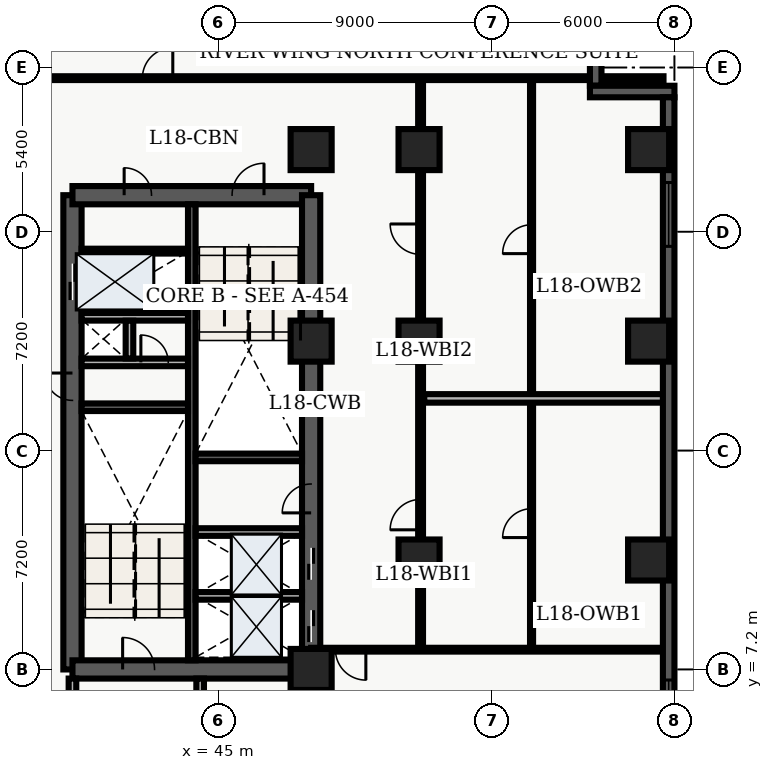
"""IFC4 building model, lengths in metres.
Left out: names, types, materials, properties, quantities, classifications, styles, units other than length and angle.
Written with IfcOpenShell. Run it as: python <this file> out.ifc"""

import sys

from ifc_helpers import new_model, entity, si_unit, converted_unit, direction, frame, origin_with_axes, origin_2d_with_axis, place, context, subcontext, project, spatial, polyline, rectangle, outline, extrude, element, fill, save


model = new_model("IFC4")
c1 = context("Model", 3, precision=1e-05, world=origin_with_axes(), true_north=direction((0.0, 1.0)))
c2 = subcontext(c1, "Body", "Model", "MODEL_VIEW")
j1 = project(units=[si_unit("LENGTHUNIT", "METRE"), converted_unit("PLANEANGLEUNIT", "DEGREE", entity("IfcPlaneAngleMeasure", 0.017), si_unit("PLANEANGLEUNIT", "RADIAN"), dimensions=[0, 0, 0, 0, 0, 0, 0])], contexts=[c1])
p1 = place(None, origin_with_axes())
s1 = spatial("IfcSite", under=j1, at=p1, CompositionType="ELEMENT")
p2 = place(p1, origin_with_axes())
s2 = spatial("IfcBuilding", under=s1, at=p2, CompositionType="ELEMENT")
p3 = place(p2, frame((0.0, 0.0, 75.6), z_axis=(0.0, 0.0, 1.0), x_axis=(1.0, 0.0, 0.0)))
s3 = spatial("IfcBuildingStorey", under=s2, at=p3, CompositionType="ELEMENT", Elevation=75.6)
p4 = place(p3, frame((40.2, 7.2, 0.0), z_axis=(0.0, 0.0, 1.0), x_axis=(0.0, 1.0, 0.0)))
e1 = element("IfcWall", 1, at=p4, inside=s3, PredefinedType="SHEAR", context=c2, shape_type="SweptSolid", body=[
    extrude(outline(polyline([(0.0, -0.3), (15.6, -0.3), (15.6, 0.3), (0.0, 0.3), (0.0, -0.3)])), origin_with_axes(), (0.0, 0.0, 1.0), 3.6),
])
p5 = place(p4, frame((12.75, 0.0, 0.0), z_axis=(0.0, 0.0, 1.0), x_axis=(1.0, 0.0, 0.0)))
e2 = element("IfcOpeningElement", 2, at=p5, cuts=e1, PredefinedType="OPENING", context=c2, shape_type="SweptSolid", body=[
    extrude(rectangle(XDim=1.2, YDim=0.62, at=origin_2d_with_axis()), origin_with_axes(), (0.0, 0.0, 1.0), 2.15),
])
p6 = place(p4, frame((9.3, 0.0, 0.0), z_axis=(0.0, 0.0, 1.0), x_axis=(1.0, 0.0, 0.0)))
e3 = element("IfcOpeningElement", 3, at=p6, cuts=e1, PredefinedType="OPENING", context=c2, shape_type="SweptSolid", body=[
    extrude(rectangle(XDim=0.9, YDim=0.62, at=origin_2d_with_axis()), origin_with_axes(), (0.0, 0.0, 1.0), 2.15),
])
p7 = place(p3, frame((40.2, 7.2, 0.0), z_axis=(0.0, 0.0, 1.0), x_axis=(1.0, 0.0, 0.0)))
e4 = element("IfcWall", 4, at=p7, inside=s3, PredefinedType="SHEAR", context=c2, shape_type="SweptSolid", body=[
    extrude(outline(polyline([(0.0, -0.3), (7.85, -0.3), (7.85, 0.3), (0.0, 0.3), (0.0, -0.3)])), origin_with_axes(), (0.0, 0.0, 1.0), 3.6),
])
p8 = place(p7, frame((2.175, 0.0, 0.0), z_axis=(0.0, 0.0, 1.0), x_axis=(1.0, 0.0, 0.0)))
e5 = element("IfcOpeningElement", 5, at=p8, cuts=e4, PredefinedType="OPENING", context=c2, shape_type="SweptSolid", body=[
    extrude(rectangle(XDim=1.05, YDim=0.62, at=origin_2d_with_axis()), origin_with_axes(), (0.0, 0.0, 1.0), 2.15),
])
p9 = place(p3, frame((40.2, 22.8, 0.0), z_axis=(0.0, 0.0, 1.0), x_axis=(1.0, 0.0, 0.0)))
e6 = element("IfcWall", 6, at=p9, inside=s3, PredefinedType="SHEAR", context=c2, shape_type="SweptSolid", body=[
    extrude(outline(polyline([(0.0, -0.3), (7.85, -0.3), (7.85, 0.3), (0.0, 0.3), (0.0, -0.3)])), origin_with_axes(), (0.0, 0.0, 1.0), 3.6),
])
p10 = place(p9, frame((5.775, 0.0, 0.0), z_axis=(0.0, 0.0, 1.0), x_axis=(1.0, 0.0, 0.0)))
e7 = element("IfcOpeningElement", 7, at=p10, cuts=e6, PredefinedType="OPENING", context=c2, shape_type="SweptSolid", body=[
    extrude(rectangle(XDim=1.05, YDim=0.62, at=origin_2d_with_axis()), origin_with_axes(), (0.0, 0.0, 1.0), 2.15),
])
p11 = place(p9, frame((2.15, 0.0, 0.0), z_axis=(0.0, 0.0, 1.0), x_axis=(1.0, 0.0, 0.0)))
e8 = element("IfcOpeningElement", 8, at=p11, cuts=e6, PredefinedType="OPENING", context=c2, shape_type="SweptSolid", body=[
    extrude(rectangle(XDim=0.9, YDim=0.62, at=origin_2d_with_axis()), origin_with_axes(), (0.0, 0.0, 1.0), 2.15),
])
p12 = place(p3, frame((48.05, 7.2, 0.0), z_axis=(0.0, 0.0, 1.0), x_axis=(0.0, 1.0, 0.0)))
e9 = element("IfcWall", 9, at=p12, inside=s3, PredefinedType="SHEAR", context=c2, shape_type="SweptSolid", body=[
    extrude(outline(polyline([(0.0, -0.3), (15.6, -0.3), (15.6, 0.3), (0.0, 0.3), (0.0, -0.3)])), origin_with_axes(), (0.0, 0.0, 1.0), 3.6),
])
p13 = place(p12, frame((1.425, 0.0, 0.0), z_axis=(0.0, 0.0, 1.0), x_axis=(1.0, 0.0, 0.0)))
e10 = element("IfcOpeningElement", 10, at=p13, cuts=e9, PredefinedType="OPENING", context=c2, shape_type="SweptSolid", body=[
    extrude(rectangle(XDim=1.05, YDim=0.62, at=origin_2d_with_axis()), origin_with_axes(), (0.0, 0.0, 1.0), 2.15),
])
p14 = place(p12, frame((3.475, 0.0, 0.0), z_axis=(0.0, 0.0, 1.0), x_axis=(1.0, 0.0, 0.0)))
e11 = element("IfcOpeningElement", 11, at=p14, cuts=e9, PredefinedType="OPENING", context=c2, shape_type="SweptSolid", body=[
    extrude(rectangle(XDim=1.05, YDim=0.62, at=origin_2d_with_axis()), origin_with_axes(), (0.0, 0.0, 1.0), 2.15),
])
p15 = place(p12, frame((5.625, 0.0, 0.0), z_axis=(0.0, 0.0, 1.0), x_axis=(1.0, 0.0, 0.0)))
e12 = element("IfcOpeningElement", 12, at=p15, cuts=e9, PredefinedType="OPENING", context=c2, shape_type="SweptSolid", body=[
    extrude(rectangle(XDim=0.95, YDim=0.62, at=origin_2d_with_axis()), origin_with_axes(), (0.0, 0.0, 1.0), 2.15),
])
p16 = place(p3, frame((44.125, 7.5, 0.0), z_axis=(0.0, 0.0, 1.0), x_axis=(0.0, 1.0, 0.0)))
e13 = element("IfcWall", 13, at=p16, inside=s3, PredefinedType="SHEAR", context=c2, shape_type="SweptSolid", body=[
    extrude(outline(polyline([(0.0, -0.125), (15.0, -0.125), (15.0, 0.125), (0.0, 0.125), (0.0, -0.125)])), origin_with_axes(), (0.0, 0.0, 1.0), 3.6),
])
for number, where, z_axis, x_axis in (
    (14, (40.5, 15.825, 0.0), (0.0, 0.0, 1.0), (1.0, 0.0, 0.0)),
    (15, (44.25, 14.175, 0.0), (0.0, 0.0, 1.0), (1.0, 0.0, 0.0)),
):
    element("IfcWall", number, at=place(p3, frame(where, z_axis=z_axis, x_axis=x_axis)), inside=s3, PredefinedType="SHEAR", context=c2, shape_type="SweptSolid", body=[
        extrude(outline(polyline([(0.0, -0.125), (3.5, -0.125), (3.5, 0.125), (0.0, 0.125), (0.0, -0.125)])), origin_with_axes(), (0.0, 0.0, 1.0), 3.6),
    ])
p17 = place(p3, frame((40.5, 17.3, 0.0), z_axis=(0.0, 0.0, 1.0), x_axis=(1.0, 0.0, 0.0)))
e16 = element("IfcWall", 16, at=p17, inside=s3, PredefinedType="SOLIDWALL", context=c2, shape_type="SweptSolid", body=[
    extrude(outline(polyline([(0.0, -0.125), (3.5, -0.125), (3.5, 0.125), (0.0, 0.125), (0.0, -0.125)])), origin_with_axes(), (0.0, 0.0, 1.0), 2.64),
])
p18 = place(p17, frame((2.4, 0.0, 0.0), z_axis=(0.0, 0.0, 1.0), x_axis=(1.0, 0.0, 0.0)))
e17 = element("IfcOpeningElement", 17, at=p18, cuts=e16, PredefinedType="OPENING", context=c2, shape_type="SweptSolid", body=[
    extrude(rectangle(XDim=0.9, YDim=0.27, at=origin_2d_with_axis()), origin_with_axes(), (0.0, 0.0, 1.0), 2.15),
])
p19 = place(p3, frame((40.5, 18.8, 0.0), z_axis=(0.0, 0.0, 1.0), x_axis=(1.0, 0.0, 0.0)))
e18 = element("IfcWall", 18, at=p19, inside=s3, PredefinedType="SOLIDWALL", context=c2, shape_type="SweptSolid", body=[
    extrude(outline(polyline([(0.0, -0.125), (3.5, -0.125), (3.5, 0.125), (0.0, 0.125), (0.0, -0.125)])), origin_with_axes(), (0.0, 0.0, 1.0), 2.64),
])
p20 = place(p3, frame((42.075, 17.43, 0.0), z_axis=(0.0, 0.0, 1.0), x_axis=(0.0, 1.0, 0.0)))
e19 = element("IfcWall", 19, at=p20, inside=s3, PredefinedType="SOLIDWALL", context=c2, shape_type="SweptSolid", body=[
    extrude(outline(polyline([(0.0, -0.125), (1.24, -0.125), (1.24, 0.125), (0.0, 0.125), (0.0, -0.125)])), origin_with_axes(), (0.0, 0.0, 1.0), 2.64),
])
p21 = place(p3, frame((40.2, 3.1, 0.0), z_axis=(0.0, 0.0, 1.0), x_axis=(0.0, 1.0, 0.0)))
e20 = element("IfcWall", 20, at=p21, inside=s3, PredefinedType="SOLIDWALL", context=c2, shape_type="SweptSolid", body=[
    extrude(outline(polyline([(0.0, -0.125), (3.8, -0.125), (3.8, 0.125), (0.0, 0.125), (0.0, -0.125)])), origin_with_axes(), (0.0, 0.0, 1.0), 2.64),
])
p22 = place(p21, frame((2.075, 0.0, 0.0), z_axis=(0.0, 0.0, 1.0), x_axis=(1.0, 0.0, 0.0)))
e21 = element("IfcOpeningElement", 21, at=p22, cuts=e20, PredefinedType="OPENING", context=c2, shape_type="SweptSolid", body=[
    extrude(rectangle(XDim=1.05, YDim=0.27, at=origin_2d_with_axis()), origin_with_axes(), (0.0, 0.0, 1.0), 2.15),
])
p23 = place(p3, frame((44.4, 3.1, 0.0), z_axis=(0.0, 0.0, 1.0), x_axis=(0.0, 1.0, 0.0)))
e22 = element("IfcWall", 22, at=p23, inside=s3, PredefinedType="SOLIDWALL", context=c2, shape_type="SweptSolid", body=[
    extrude(outline(polyline([(0.0, -0.125), (3.8, -0.125), (3.8, 0.125), (0.0, 0.125), (0.0, -0.125)])), origin_with_axes(), (0.0, 0.0, 1.0), 2.64),
])
for number, where, z_axis, x_axis in (
    (23, (48.05, 7.2, 0.0), (0.0, 0.0, 1.0), (1.0, 0.0, 0.0)),
    (24, (48.05, 18.0, 0.0), (0.0, 0.0, 1.0), (1.0, 0.0, 0.0)),
    (25, (48.05, 24.3, 0.0), (0.0, 0.0, 1.0), (1.0, 0.0, 0.0)),
    (26, (51.6, 10.8, 0.0), (0.0, 0.0, 1.0), (1.0, 0.0, 0.0)),
    (27, (51.6, 18.0, 0.0), (0.0, 0.0, 1.0), (1.0, 0.0, 0.0)),
    (28, (51.6, 24.3, 0.0), (0.0, 0.0, 1.0), (1.0, 0.0, 0.0)),
    (29, (59.15, 10.8, 0.0), (0.0, 0.0, 1.0), (1.0, 0.0, 0.0)),
    (30, (59.15, 18.0, 0.0), (0.0, 0.0, 1.0), (1.0, 0.0, 0.0)),
    (31, (59.15, 24.3, 0.0), (0.0, 0.0, 1.0), (1.0, 0.0, 0.0)),
):
    element("IfcColumn", number, at=place(p3, frame(where, z_axis=z_axis, x_axis=x_axis)), inside=s3, PredefinedType="COLUMN", context=c2, shape_type="SweptSolid", body=[
        extrude(rectangle(XDim=1.35, YDim=1.35, at=origin_2d_with_axis()), origin_with_axes(), (0.0, 0.0, 1.0), 3.9),
    ])
p24 = place(p3, frame((40.5, 20.96, 0.0), z_axis=(0.0, 0.0, 1.0), x_axis=(1.0, 0.0, 0.0)))
e32 = element("IfcWall", 32, at=p24, inside=s3, PredefinedType="PARTITIONING", context=c2, shape_type="SweptSolid", body=[
    extrude(outline(polyline([(0.0, -0.08), (3.5, -0.08), (3.5, 0.08), (0.0, 0.08), (0.0, -0.08)])), origin_with_axes(), (0.0, 0.0, 1.0), 2.64),
])
for number, where, z_axis, x_axis in (
    (33, (44.25, 9.62, 0.0), (0.0, 0.0, 1.0), (1.0, 0.0, 0.0)),
    (34, (44.25, 11.72, 0.0), (0.0, 0.0, 1.0), (1.0, 0.0, 0.0)),
):
    element("IfcWall", number, at=place(p3, frame(where, z_axis=z_axis, x_axis=x_axis)), inside=s3, PredefinedType="SOLIDWALL", context=c2, shape_type="SweptSolid", body=[
        extrude(outline(polyline([(0.0, -0.125), (3.5, -0.125), (3.5, 0.125), (0.0, 0.125), (0.0, -0.125)])), origin_with_axes(), (0.0, 0.0, 1.0), 2.64),
    ])
p25 = place(p3, frame((51.65, 7.85, 0.0), z_axis=(0.0, 0.0, 1.0), x_axis=(0.0, 1.0, 0.0)))
e35 = element("IfcWall", 35, at=p25, inside=s3, PredefinedType="PARTITIONING", context=c2, shape_type="SweptSolid", body=[
    extrude(outline(polyline([(0.0, -0.08), (18.8, -0.08), (18.8, 0.08), (0.0, 0.08), (0.0, -0.08)])), origin_with_axes(), (0.0, 0.0, 1.0), 2.64),
])
p26 = place(p25, frame((4.443, 0.0, 0.0), z_axis=(0.0, 0.0, 1.0), x_axis=(1.0, 0.0, 0.0)))
e36 = element("IfcOpeningElement", 36, at=p26, cuts=e35, PredefinedType="OPENING", context=c2, shape_type="SweptSolid", body=[
    extrude(rectangle(XDim=1.0, YDim=0.18, at=origin_2d_with_axis()), origin_with_axes(), (0.0, 0.0, 1.0), 2.15),
])
p27 = place(p25, frame((13.503, 0.0, 0.0), z_axis=(0.0, 0.0, 1.0), x_axis=(1.0, 0.0, 0.0)))
e37 = element("IfcOpeningElement", 37, at=p27, cuts=e35, PredefinedType="OPENING", context=c2, shape_type="SweptSolid", body=[
    extrude(rectangle(XDim=1.0, YDim=0.18, at=origin_2d_with_axis()), origin_with_axes(), (0.0, 0.0, 1.0), 2.15),
])
p28 = place(p3, frame((59.64, 7.85, 0.0), z_axis=(0.0, 0.0, 1.0), x_axis=(-1.0, 0.0, 0.0)))
e38 = element("IfcWall", 38, at=p28, inside=s3, PredefinedType="PARTITIONING", context=c2, shape_type="SweptSolid", body=[
    extrude(outline(polyline([(0.0, -0.062), (11.59, -0.062), (11.59, 0.062), (0.0, 0.062), (0.0, -0.062)])), origin_with_axes(), (0.0, 0.0, 1.0), 2.64),
])
p29 = place(p28, frame((10.29, 0.0, 0.0), z_axis=(0.0, 0.0, 1.0), x_axis=(1.0, 0.0, 0.0)))
e39 = element("IfcOpeningElement", 39, at=p29, cuts=e38, PredefinedType="OPENING", context=c2, shape_type="SweptSolid", body=[
    extrude(rectangle(XDim=1.0, YDim=0.145, at=origin_2d_with_axis()), origin_with_axes(), (0.0, 0.0, 1.0), 2.15),
])
p30 = place(p3, frame((38.76, 26.65, 0.0), z_axis=(0.0, 0.0, 1.0), x_axis=(1.0, 0.0, 0.0)))
e40 = element("IfcWall", 40, at=p30, inside=s3, PredefinedType="PARTITIONING", context=c2, shape_type="SweptSolid", body=[
    extrude(outline(polyline([(0.0, -0.062), (20.88, -0.062), (20.88, 0.062), (0.0, 0.062), (0.0, -0.062)])), origin_with_axes(), (0.0, 0.0, 1.0), 2.64),
])
p31 = place(p30, frame((4.24, 0.0, 0.0), z_axis=(0.0, 0.0, 1.0), x_axis=(1.0, 0.0, 0.0)))
e41 = element("IfcOpeningElement", 41, at=p31, cuts=e40, PredefinedType="OPENING", context=c2, shape_type="SweptSolid", body=[
    extrude(rectangle(XDim=1.0, YDim=0.145, at=origin_2d_with_axis()), origin_with_axes(), (0.0, 0.0, 1.0), 2.15),
])
p32 = place(p3, frame((55.3, 7.98, 0.0), z_axis=(0.0, 0.0, 1.0), x_axis=(0.0, 1.0, 0.0)))
e42 = element("IfcWall", 42, at=p32, inside=s3, PredefinedType="PARTITIONING", context=c2, shape_type="SweptSolid", body=[
    extrude(outline(polyline([(0.0, -0.05), (18.54, -0.05), (18.54, 0.05), (0.0, 0.05), (0.0, -0.05)])), origin_with_axes(), (0.0, 0.0, 1.0), 2.64),
])
p33 = place(p32, frame((4.033, 0.0, 0.0), z_axis=(0.0, 0.0, 1.0), x_axis=(1.0, 0.0, 0.0)))
e43 = element("IfcOpeningElement", 43, at=p33, cuts=e42, PredefinedType="OPENING", context=c2, shape_type="SweptSolid", body=[
    extrude(rectangle(XDim=0.95, YDim=0.12, at=origin_2d_with_axis()), origin_with_axes(), (0.0, 0.0, 1.0), 2.15),
])
p34 = place(p32, frame((13.373, 0.0, 0.0), z_axis=(0.0, 0.0, 1.0), x_axis=(1.0, 0.0, 0.0)))
e44 = element("IfcOpeningElement", 44, at=p34, cuts=e42, PredefinedType="OPENING", context=c2, shape_type="SweptSolid", body=[
    extrude(rectangle(XDim=0.95, YDim=0.12, at=origin_2d_with_axis()), origin_with_axes(), (0.0, 0.0, 1.0), 2.15),
])
p35 = place(p3, frame((51.77, 16.116, 0.0), z_axis=(0.0, 0.0, 1.0), x_axis=(1.0, 0.0, 0.0)))
e45 = element("IfcWall", 45, at=p35, inside=s3, PredefinedType="PARTITIONING", context=c2, shape_type="SweptSolid", body=[
    extrude(outline(polyline([(0.0, -0.14), (7.855, -0.14), (7.855, 0.14), (0.0, 0.14), (0.0, -0.14)])), origin_with_axes(), (0.0, 0.0, 1.0), 2.64),
])
p36 = place(p3, frame((57.41, 28.42, 0.0), z_axis=(0.0, 0.0, 1.0), x_axis=(0.0, -1.0, 0.0)))
e46 = element("IfcWall", 46, at=p36, inside=s3, PredefinedType="SOLIDWALL", context=c2, shape_type="SweptSolid", body=[
    extrude(outline(polyline([(0.0, -0.19), (2.02, -0.19), (2.02, 0.19), (0.0, 0.19), (0.0, -0.19)])), origin_with_axes(), (0.0, 0.0, 1.0), 3.6),
])
p37 = place(p3, frame((57.22, 26.21, 0.0), z_axis=(0.0, 0.0, 1.0), x_axis=(1.0, 0.0, 0.0)))
e47 = element("IfcWall", 47, at=p37, inside=s3, PredefinedType="SOLIDWALL", context=c2, shape_type="SweptSolid", body=[
    extrude(outline(polyline([(0.0, -0.19), (2.78, -0.19), (2.78, 0.19), (0.0, 0.19), (0.0, -0.19)])), origin_with_axes(), (0.0, 0.0, 1.0), 3.6),
])
p38 = place(p3, frame((59.81, 26.02, 0.0), z_axis=(0.0, 0.0, 1.0), x_axis=(0.0, -1.0, 0.0)))
e48 = element("IfcWall", 48, at=p38, inside=s3, PredefinedType="SOLIDWALL", context=c2, shape_type="SweptSolid", body=[
    extrude(outline(polyline([(0.0, -0.19), (23.62, -0.19), (23.62, 0.19), (0.0, 0.19), (0.0, -0.19)])), origin_with_axes(), (0.0, 0.0, 1.0), 3.6),
])
p39 = place(p38, frame((3.853, 0.0, 0.45), z_axis=(0.0, 0.0, 1.0), x_axis=(1.0, 0.0, 0.0)))
e49 = element("IfcOpeningElement", 49, at=p39, cuts=e48, PredefinedType="OPENING", context=c2, shape_type="SweptSolid", body=[
    extrude(rectangle(XDim=2.1, YDim=0.4, at=origin_2d_with_axis()), origin_with_axes(), (0.0, 0.0, 1.0), 2.2),
])
p40 = place(p38, frame((20.218, 0.0, 0.45), z_axis=(0.0, 0.0, 1.0), x_axis=(1.0, 0.0, 0.0)))
e50 = element("IfcOpeningElement", 50, at=p40, cuts=e48, PredefinedType="OPENING", context=c2, shape_type="SweptSolid", body=[
    extrude(rectangle(XDim=2.1, YDim=0.4, at=origin_2d_with_axis()), origin_with_axes(), (0.0, 0.0, 1.0), 2.2),
])
p41 = place(p12, frame((1.425, 0.0, 0.0), z_axis=(0.0, 0.0, 1.0), x_axis=(1.0, 0.0, 0.0)))
e51 = element("IfcDoor", 51, at=p41, inside=s3, OperationType="SLIDING_TO_LEFT", PredefinedType="DOOR", context=c2, shape_type="SweptSolid", body=[
    extrude(rectangle(XDim=1.05, YDim=0.09, at=origin_2d_with_axis()), origin_with_axes(), (0.0, 0.0, 1.0), 2.15),
])
fill(e10, e51)
p42 = place(p12, frame((3.475, 0.0, 0.0), z_axis=(0.0, 0.0, 1.0), x_axis=(1.0, 0.0, 0.0)))
e52 = element("IfcDoor", 52, at=p42, inside=s3, OperationType="SLIDING_TO_RIGHT", PredefinedType="DOOR", context=c2, shape_type="SweptSolid", body=[
    extrude(rectangle(XDim=1.05, YDim=0.09, at=origin_2d_with_axis()), origin_with_axes(), (0.0, 0.0, 1.0), 2.15),
])
fill(e11, e52)
p43 = place(p4, frame((12.75, 0.0, 0.0), z_axis=(0.0, 0.0, 1.0), x_axis=(1.0, 0.0, 0.0)))
e53 = element("IfcDoor", 53, at=p43, inside=s3, OperationType="DOUBLE_DOOR_SLIDING", PredefinedType="DOOR", context=c2, shape_type="SweptSolid", body=[
    extrude(rectangle(XDim=1.2, YDim=0.09, at=origin_2d_with_axis()), origin_with_axes(), (0.0, 0.0, 1.0), 2.15),
])
fill(e2, e53)
p44 = place(p4, frame((9.3, 0.0, 0.0), z_axis=(0.0, 0.0, 1.0), x_axis=(1.0, 0.0, 0.0)))
e54 = element("IfcDoor", 54, at=p44, inside=s3, OperationType="SINGLE_SWING_RIGHT", PredefinedType="DOOR", context=c2, shape_type="SweptSolid", body=[
    extrude(rectangle(XDim=0.9, YDim=0.09, at=origin_2d_with_axis()), origin_with_axes(), (0.0, 0.0, 1.0), 2.15),
])
fill(e3, e54)
p45 = place(p17, frame((2.4, 0.0, 0.0), z_axis=(0.0, 0.0, 1.0), x_axis=(1.0, 0.0, 0.0)))
e55 = element("IfcDoor", 55, at=p45, inside=s3, OperationType="SINGLE_SWING_LEFT", PredefinedType="DOOR", context=c2, shape_type="SweptSolid", body=[
    extrude(rectangle(XDim=0.9, YDim=0.09, at=origin_2d_with_axis()), origin_with_axes(), (0.0, 0.0, 1.0), 2.15),
])
fill(e17, e55)
p46 = place(p7, frame((2.175, 0.0, 0.0), z_axis=(0.0, 0.0, 1.0), x_axis=(1.0, 0.0, 0.0)))
e56 = element("IfcDoor", 56, at=p46, inside=s3, OperationType="SINGLE_SWING_LEFT", PredefinedType="DOOR", context=c2, shape_type="SweptSolid", body=[
    extrude(rectangle(XDim=1.05, YDim=0.09, at=origin_2d_with_axis()), origin_with_axes(), (0.0, 0.0, 1.0), 2.15),
])
fill(e5, e56)
p47 = place(p9, frame((5.775, 0.0, 0.0), z_axis=(0.0, 0.0, 1.0), x_axis=(1.0, 0.0, 0.0)))
e57 = element("IfcDoor", 57, at=p47, inside=s3, OperationType="SINGLE_SWING_RIGHT", PredefinedType="DOOR", context=c2, shape_type="SweptSolid", body=[
    extrude(rectangle(XDim=1.05, YDim=0.09, at=origin_2d_with_axis()), origin_with_axes(), (0.0, 0.0, 1.0), 2.15),
])
fill(e7, e57)
p48 = place(p9, frame((2.15, 0.0, 0.0), z_axis=(0.0, 0.0, 1.0), x_axis=(1.0, 0.0, 0.0)))
e58 = element("IfcDoor", 58, at=p48, inside=s3, OperationType="SINGLE_SWING_LEFT", PredefinedType="DOOR", context=c2, shape_type="SweptSolid", body=[
    extrude(rectangle(XDim=0.9, YDim=0.09, at=origin_2d_with_axis()), origin_with_axes(), (0.0, 0.0, 1.0), 2.15),
])
fill(e8, e58)
p49 = place(p12, frame((5.625, 0.0, 0.0), z_axis=(0.0, 0.0, 1.0), x_axis=(1.0, 0.0, 0.0)))
e59 = element("IfcDoor", 59, at=p49, inside=s3, OperationType="SINGLE_SWING_LEFT", PredefinedType="DOOR", context=c2, shape_type="SweptSolid", body=[
    extrude(rectangle(XDim=0.95, YDim=0.09, at=origin_2d_with_axis()), origin_with_axes(), (0.0, 0.0, 1.0), 2.15),
])
fill(e12, e59)
p50 = place(p28, frame((10.29, 0.0, 0.0), z_axis=(0.0, 0.0, 1.0), x_axis=(1.0, 0.0, 0.0)))
e60 = element("IfcDoor", 60, at=p50, inside=s3, OperationType="SINGLE_SWING_LEFT", PredefinedType="DOOR", context=c2, shape_type="SweptSolid", body=[
    extrude(rectangle(XDim=1.0, YDim=0.075, at=origin_2d_with_axis()), origin_with_axes(), (0.0, 0.0, 1.0), 2.15),
])
fill(e39, e60)
p51 = place(p30, frame((4.24, 0.0, 0.0), z_axis=(0.0, 0.0, 1.0), x_axis=(1.0, 0.0, 0.0)))
e61 = element("IfcDoor", 61, at=p51, inside=s3, OperationType="SINGLE_SWING_RIGHT", PredefinedType="DOOR", context=c2, shape_type="SweptSolid", body=[
    extrude(rectangle(XDim=1.0, YDim=0.075, at=origin_2d_with_axis()), origin_with_axes(), (0.0, 0.0, 1.0), 2.15),
])
fill(e41, e61)
p52 = place(p32, frame((4.033, 0.0, 0.0), z_axis=(0.0, 0.0, 1.0), x_axis=(1.0, 0.0, 0.0)))
e62 = element("IfcDoor", 62, at=p52, inside=s3, OperationType="SINGLE_SWING_LEFT", PredefinedType="DOOR", context=c2, shape_type="SweptSolid", body=[
    extrude(rectangle(XDim=0.95, YDim=0.06, at=origin_2d_with_axis()), origin_with_axes(), (0.0, 0.0, 1.0), 2.15),
])
fill(e43, e62)
p53 = place(p25, frame((4.443, 0.0, 0.0), z_axis=(0.0, 0.0, 1.0), x_axis=(1.0, 0.0, 0.0)))
e63 = element("IfcDoor", 63, at=p53, inside=s3, OperationType="SINGLE_SWING_LEFT", PredefinedType="DOOR", context=c2, shape_type="SweptSolid", body=[
    extrude(rectangle(XDim=1.0, YDim=0.09, at=origin_2d_with_axis()), origin_with_axes(), (0.0, 0.0, 1.0), 2.15),
])
fill(e36, e63)
p54 = place(p32, frame((13.373, 0.0, 0.0), z_axis=(0.0, 0.0, 1.0), x_axis=(1.0, 0.0, 0.0)))
e64 = element("IfcDoor", 64, at=p54, inside=s3, OperationType="SINGLE_SWING_LEFT", PredefinedType="DOOR", context=c2, shape_type="SweptSolid", body=[
    extrude(rectangle(XDim=0.95, YDim=0.06, at=origin_2d_with_axis()), origin_with_axes(), (0.0, 0.0, 1.0), 2.15),
])
fill(e44, e64)
p55 = place(p25, frame((13.503, 0.0, 0.0), z_axis=(0.0, 0.0, 1.0), x_axis=(1.0, 0.0, 0.0)))
e65 = element("IfcDoor", 65, at=p55, inside=s3, OperationType="SINGLE_SWING_RIGHT", PredefinedType="DOOR", context=c2, shape_type="SweptSolid", body=[
    extrude(rectangle(XDim=1.0, YDim=0.09, at=origin_2d_with_axis()), origin_with_axes(), (0.0, 0.0, 1.0), 2.15),
])
fill(e37, e65)
p56 = place(p38, frame((3.853, 0.0, 0.45), z_axis=(0.0, 0.0, 1.0), x_axis=(1.0, 0.0, 0.0)))
e66 = element("IfcWindow", 66, at=p56, inside=s3, PredefinedType="WINDOW", context=c2, shape_type="SweptSolid", body=[
    extrude(rectangle(XDim=2.1, YDim=0.09, at=origin_2d_with_axis()), origin_with_axes(), (0.0, 0.0, 1.0), 2.2),
])
fill(e49, e66)
p57 = place(p38, frame((20.218, 0.0, 0.45), z_axis=(0.0, 0.0, 1.0), x_axis=(1.0, 0.0, 0.0)))
e67 = element("IfcWindow", 67, at=p57, inside=s3, PredefinedType="WINDOW", context=c2, shape_type="SweptSolid", body=[
    extrude(rectangle(XDim=2.1, YDim=0.09, at=origin_2d_with_axis()), origin_with_axes(), (0.0, 0.0, 1.0), 2.2),
])
fill(e50, e67)
save(model, sys.argv[1])
